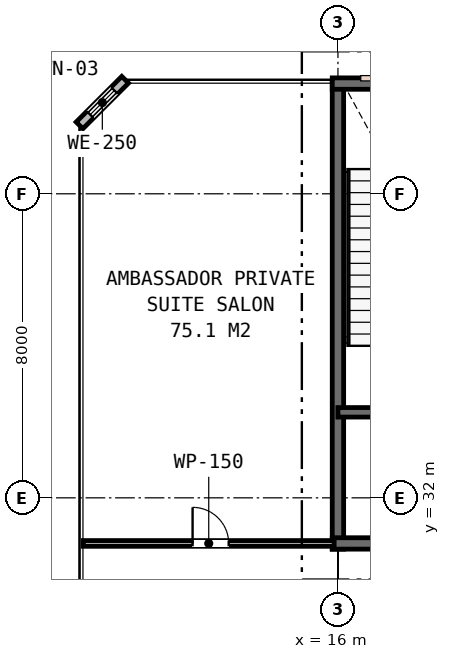
"""IFC4 building model, lengths in metres.
Left out: names, types, materials, properties, quantities, classifications, styles, units other than length and angle.
Written with IfcOpenShell. Run it as: python <this file> out.ifc"""

import sys

from ifc_helpers import new_model, si_unit, direction, frame, frame_2d, origin, place, context, subcontext, project, spatial, rectangle, extrude, element, fill, save


model = new_model("IFC4")
c1 = context("Model", 3, precision=1e-05, world=origin(), true_north=direction((0.0, 1.0)))
c2 = subcontext(c1, "Body", "Model", "MODEL_VIEW")
j1 = project(units=[si_unit("LENGTHUNIT", "METRE"), si_unit("PLANEANGLEUNIT", "RADIAN")], contexts=[c1])
p1 = place(None, origin())
s1 = spatial("IfcSite", under=j1, at=p1, CompositionType="ELEMENT")
p2 = place(p1, origin())
s2 = spatial("IfcBuilding", under=s1, at=p2, CompositionType="ELEMENT")
p3 = place(p2, frame((0.0, 0.0, 295.8)))
s3 = spatial("IfcBuildingStorey", under=s2, at=p3, CompositionType="ELEMENT", Elevation=295.8)
p4 = place(p3, frame((16.0, 30.65, 0.0), z_axis=(0.0, 0.0, 1.0), x_axis=(0.0, 1.0, 0.0)))
e1 = element("IfcWall", 1, at=p4, inside=s3, PredefinedType="SHEAR", context=c2, shape_type="SweptSolid", body=[
    extrude(rectangle(XDim=12.3, YDim=0.3, at=frame_2d((6.15, 0.0))), origin(), (0.0, 0.0, 1.0), 5.2),
])
p5 = place(p3, frame((15.85, 42.9, 0.0), z_axis=(0.0, 0.0, 1.0), x_axis=(1.0, 0.0, 0.0)))
e2 = element("IfcWall", 2, at=p5, inside=s3, PredefinedType="SHEAR", context=c2, shape_type="SweptSolid", body=[
    extrude(rectangle(XDim=24.3, YDim=0.3, at=frame_2d((12.15, 0.0))), origin(), (0.0, 0.0, 1.0), 5.2),
])
p6 = place(p3, frame((15.85, 30.8, 0.0), z_axis=(0.0, 0.0, 1.0), x_axis=(1.0, 0.0, 0.0)))
e3 = element("IfcWall", 3, at=p6, inside=s3, PredefinedType="SHEAR", context=c2, shape_type="SweptSolid", body=[
    extrude(rectangle(XDim=11.2, YDim=0.3, at=frame_2d((5.6, 0.0))), origin(), (0.0, 0.0, 1.0), 5.2),
])
p7 = place(p6, frame((2.45, 0.0, 0.0)))
e4 = element("IfcOpeningElement", 4, at=p7, cuts=e3, PredefinedType="OPENING", context=c2, shape_type="SweptSolid", body=[
    extrude(rectangle(XDim=1.1, YDim=2.15, at=frame_2d((0.55, 1.075))), frame((0.0, 0.16, 0.0), z_axis=(0.0, -1.0, 0.0), x_axis=(1.0, 0.0, 0.0)), (0.0, 0.0, 1.0), 0.32),
])
p8 = place(p3, frame((16.0, 34.25, 0.0), z_axis=(0.0, 0.0, 1.0), x_axis=(1.0, 0.0, 0.0)))
e5 = element("IfcWall", 5, at=p8, inside=s3, PredefinedType="SHEAR", context=c2, shape_type="SweptSolid", body=[
    extrude(rectangle(XDim=6.05, YDim=0.25, at=frame_2d((3.025, 0.0))), origin(), (0.0, 0.0, 1.0), 5.2),
])
p9 = place(p8, frame((1.25, 0.0, 0.0)))
e6 = element("IfcOpeningElement", 6, at=p9, cuts=e5, PredefinedType="OPENING", context=c2, shape_type="SweptSolid", body=[
    extrude(rectangle(XDim=1.0, YDim=2.15, at=frame_2d((0.5, 1.075))), frame((0.0, 0.135, 0.0), z_axis=(0.0, -1.0, 0.0), x_axis=(1.0, 0.0, 0.0)), (0.0, 0.0, 1.0), 0.27),
])
p10 = place(p8, frame((4.2, 0.0, 0.0)))
e7 = element("IfcOpeningElement", 7, at=p10, cuts=e5, PredefinedType="OPENING", context=c2, shape_type="SweptSolid", body=[
    extrude(rectangle(XDim=1.1, YDim=2.15, at=frame_2d((0.55, 1.075))), frame((0.0, 0.135, 0.0), z_axis=(0.0, -1.0, 0.0), x_axis=(1.0, 0.0, 0.0)), (0.0, 0.0, 1.0), 0.27),
])
p11 = place(p3, frame((10.4, 43.0, 0.0), z_axis=(0.0, 0.0, 1.0), x_axis=(-0.707106781187, -0.707106781187, 0.0)))
e8 = element("IfcWall", 8, at=p11, inside=s3, PredefinedType="STANDARD", context=c2, shape_type="SweptSolid", body=[
    extrude(rectangle(XDim=1.697, YDim=0.25, at=frame_2d((0.849, 0.0))), origin(), (0.0, 0.0, 1.0), 4.91),
])
p12 = place(p11, frame((0.399, 0.0, 0.9)))
e9 = element("IfcOpeningElement", 9, at=p12, cuts=e8, PredefinedType="OPENING", context=c2, shape_type="SweptSolid", body=[
    extrude(rectangle(XDim=0.9, YDim=1.55, at=frame_2d((0.45, 0.775))), frame((0.0, 0.135, 0.0), z_axis=(0.0, -1.0, 0.0), x_axis=(1.0, 0.0, 0.0)), (0.0, 0.0, 1.0), 0.27),
])
p13 = place(p3, frame((9.3, 30.8, 0.0), z_axis=(0.0, 0.0, 1.0), x_axis=(1.0, 0.0, 0.0)))
e10 = element("IfcWall", 10, at=p13, inside=s3, PredefinedType="PARTITIONING", context=c2, shape_type="SweptSolid", body=[
    extrude(rectangle(XDim=6.6, YDim=0.15, at=frame_2d((3.3, 0.0))), origin(), (0.0, 0.0, 1.0), 4.91),
])
p14 = place(p13, frame((2.875, 0.0, 0.0)))
e11 = element("IfcOpeningElement", 11, at=p14, cuts=e10, PredefinedType="OPENING", context=c2, shape_type="SweptSolid", body=[
    extrude(rectangle(XDim=0.95, YDim=2.15, at=frame_2d((0.475, 1.075))), frame((0.0, 0.085, 0.0), z_axis=(0.0, -1.0, 0.0), x_axis=(1.0, 0.0, 0.0)), (0.0, 0.0, 1.0), 0.17),
])
p15 = place(p12, origin())
e12 = element("IfcWindow", 12, at=p15, inside=s3, PartitioningType="SINGLE_PANEL", PredefinedType="WINDOW", context=c2, shape_type="SweptSolid", body=[
    extrude(rectangle(XDim=0.9, YDim=1.55, at=frame_2d((0.45, 0.775))), frame((0.0, 0.03, 0.0), z_axis=(0.0, -1.0, 0.0), x_axis=(1.0, 0.0, 0.0)), (0.0, 0.0, 1.0), 0.06),
])
fill(e9, e12)
p16 = place(p14, origin())
e13 = element("IfcDoor", 13, at=p16, inside=s3, OperationType="SINGLE_SWING_LEFT", PredefinedType="DOOR", context=c2, shape_type="SweptSolid", body=[
    extrude(rectangle(XDim=0.95, YDim=2.15, at=frame_2d((0.475, 1.075))), frame((0.0, 0.025, 0.0), z_axis=(0.0, -1.0, 0.0), x_axis=(1.0, 0.0, 0.0)), (0.0, 0.0, 1.0), 0.05),
])
fill(e11, e13)
save(model, sys.argv[1])
